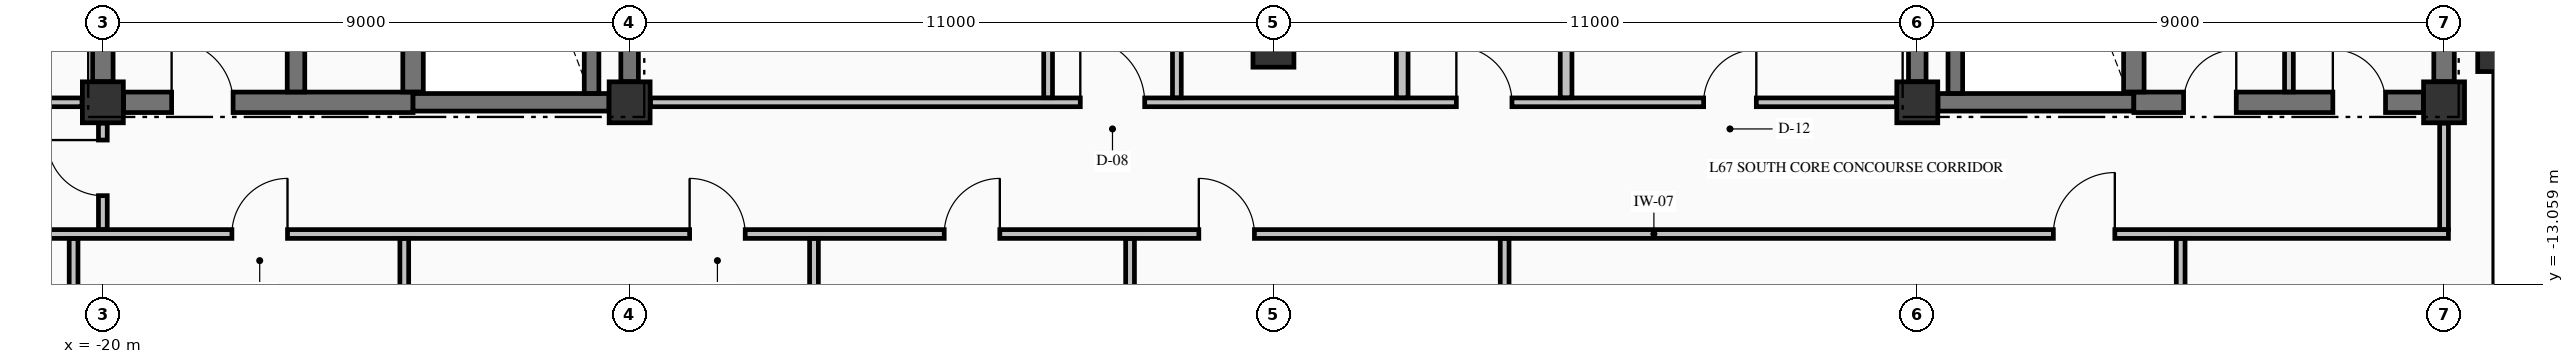
"""IFC4 building model, lengths in metres.
Left out: names, types, materials, properties, quantities, classifications, styles, units other than length and angle.
Written with IfcOpenShell. Run it as: python <this file> out.ifc"""

import sys

from ifc_helpers import new_model, si_unit, direction, frame, frame_2d, origin, origin_2d, place, context, subcontext, project, spatial, rectangle, extrude, element, fill, save


model = new_model("IFC4")
c1 = context("Model", 3, precision=1e-05, world=origin(), true_north=direction((0.0, 1.0)))
c2 = subcontext(c1, "Body", "Model", "MODEL_VIEW")
j1 = project(units=[si_unit("LENGTHUNIT", "METRE"), si_unit("PLANEANGLEUNIT", "RADIAN")], contexts=[c1])
p1 = place(None, origin())
s1 = spatial("IfcSite", under=j1, at=p1, CompositionType="ELEMENT")
p2 = place(p1, origin())
s2 = spatial("IfcBuilding", under=s1, at=p2, CompositionType="ELEMENT")
p3 = place(p2, frame((0.0, 0.0, 254.43)))
s3 = spatial("IfcBuildingStorey", under=s2, at=p3, CompositionType="ELEMENT", Elevation=254.43)
p4 = place(p3, frame((21.0, -9.0, -0.425), z_axis=(0.0, 0.0, 1.0), x_axis=(1.0, 0.0, 0.0)))
e1 = element("IfcColumn", 1, at=p4, inside=s3, PredefinedType="COLUMN", context=c2, shape_type="SweptSolid", body=[
    extrude(rectangle(XDim=0.85, YDim=0.85, at=origin_2d()), origin(), (0.0, 0.0, 1.0), 3.405),
])
for number, where, z_axis, x_axis in (
    (2, (-20.0, -9.95, -0.425), (0.0, 0.0, 1.0), (1.0, 0.0, 0.0)),
    (3, (-11.0, -9.95, -0.425), (0.0, 0.0, 1.0), (1.0, 0.0, 0.0)),
    (4, (11.0, -9.95, -0.425), (0.0, 0.0, 1.0), (1.0, 0.0, 0.0)),
    (5, (20.0, -9.95, -0.425), (0.0, 0.0, 1.0), (1.0, 0.0, 0.0)),
    (6, (0.0, -9.0, -0.425), (0.0, 0.0, 1.0), (1.0, 0.0, 0.0)),
):
    element("IfcColumn", number, at=place(p3, frame(where, z_axis=z_axis, x_axis=x_axis)), inside=s3, PredefinedType="COLUMN", context=c2, shape_type="SweptSolid", body=[
        extrude(rectangle(XDim=0.7, YDim=0.7, at=origin_2d()), origin(), (0.0, 0.0, 1.0), 3.405),
    ])
p5 = place(p3, frame((21.0, -17.545, 0.0), z_axis=(0.0, 0.0, 1.0), x_axis=(0.0, 1.0, 0.0)))
e7 = element("IfcWall", 7, at=p5, inside=s3, PredefinedType="STANDARD", context=c2, shape_type="SweptSolid", body=[
    extrude(rectangle(XDim=8.09, YDim=0.3, at=frame_2d((4.045, 0.0))), origin(), (0.0, 0.0, 1.0), 2.372),
])
p6 = place(p3, frame((-19.646, -9.95, 0.0), z_axis=(0.0, 0.0, 1.0), x_axis=(1.0, 0.0, 0.0)))
e8 = element("IfcWall", 8, at=p6, inside=s3, PredefinedType="SHEAR", context=c2, shape_type="SweptSolid", body=[
    extrude(rectangle(XDim=4.946, YDim=0.35, at=frame_2d((2.473, 0.0))), origin(), (0.0, 0.0, 1.0), 2.98),
])
p7 = place(p6, frame((0.821, 0.0, 0.0)))
e9 = element("IfcOpeningElement", 9, at=p7, cuts=e8, PredefinedType="OPENING", context=c2, shape_type="SweptSolid", body=[
    extrude(rectangle(XDim=1.05, YDim=2.15, at=frame_2d((0.525, 1.075))), frame((0.0, 0.185, 0.0), z_axis=(0.0, -1.0, 0.0), x_axis=(1.0, 0.0, 0.0)), (0.0, 0.0, 1.0), 0.37),
])
for number, where, z_axis, x_axis in (
    (10, (-14.7, -9.95, 0.0), (0.0, 0.0, 1.0), (1.0, 0.0, 0.0)),
    (11, (11.354, -9.95, 0.0), (0.0, 0.0, 1.0), (1.0, 0.0, 0.0)),
):
    element("IfcWall", number, at=place(p3, frame(where, z_axis=z_axis, x_axis=x_axis)), inside=s3, PredefinedType="SHEAR", context=c2, shape_type="SweptSolid", body=[
        extrude(rectangle(XDim=3.346, YDim=0.3, at=frame_2d((1.673, 0.0))), origin(), (0.0, 0.0, 1.0), 2.98),
    ])
p8 = place(p3, frame((14.7, -9.95, 0.0), z_axis=(0.0, 0.0, 1.0), x_axis=(1.0, 0.0, 0.0)))
e12 = element("IfcWall", 12, at=p8, inside=s3, PredefinedType="SHEAR", context=c2, shape_type="SweptSolid", body=[
    extrude(rectangle(XDim=4.946, YDim=0.35, at=frame_2d((2.473, 0.0))), origin(), (0.0, 0.0, 1.0), 2.98),
])
p9 = place(p8, frame((0.85, 0.0, 0.0)))
e13 = element("IfcOpeningElement", 13, at=p9, cuts=e12, PredefinedType="OPENING", context=c2, shape_type="SweptSolid", body=[
    extrude(rectangle(XDim=0.9, YDim=2.15, at=frame_2d((0.45, 1.075))), frame((0.0, 0.185, 0.0), z_axis=(0.0, -1.0, 0.0), x_axis=(1.0, 0.0, 0.0)), (0.0, 0.0, 1.0), 0.37),
])
p10 = place(p8, frame((3.4, 0.0, 0.0)))
e14 = element("IfcOpeningElement", 14, at=p10, cuts=e12, PredefinedType="OPENING", context=c2, shape_type="SweptSolid", body=[
    extrude(rectangle(XDim=0.9, YDim=2.15, at=frame_2d((0.45, 1.075))), frame((0.0, 0.185, 0.0), z_axis=(0.0, -1.0, 0.0), x_axis=(1.0, 0.0, 0.0)), (0.0, 0.0, 1.0), 0.37),
])
p11 = place(p3, frame((-25.835, -12.2, 0.0), z_axis=(0.0, 0.0, 1.0), x_axis=(1.0, 0.0, 0.0)))
e15 = element("IfcWall", 15, at=p11, inside=s3, PredefinedType="PARTITIONING", context=c2, shape_type="SweptSolid", body=[
    extrude(rectangle(XDim=45.91, YDim=0.15, at=frame_2d((22.955, 0.0))), origin(), (0.0, 0.0, 1.0), 2.98),
])
p12 = place(p11, frame((8.04, 0.0, 0.0)))
e16 = element("IfcOpeningElement", 16, at=p12, cuts=e15, PredefinedType="OPENING", context=c2, shape_type="SweptSolid", body=[
    extrude(rectangle(XDim=0.95, YDim=2.15, at=frame_2d((0.475, 1.075))), frame((0.0, 0.085, 0.0), z_axis=(0.0, -1.0, 0.0), x_axis=(1.0, 0.0, 0.0)), (0.0, 0.0, 1.0), 0.17),
])
p13 = place(p11, frame((15.86, 0.0, 0.0)))
e17 = element("IfcOpeningElement", 17, at=p13, cuts=e15, PredefinedType="OPENING", context=c2, shape_type="SweptSolid", body=[
    extrude(rectangle(XDim=0.95, YDim=2.15, at=frame_2d((0.475, 1.075))), frame((0.0, 0.085, 0.0), z_axis=(0.0, -1.0, 0.0), x_axis=(1.0, 0.0, 0.0)), (0.0, 0.0, 1.0), 0.17),
])
p14 = place(p11, frame((20.21, 0.0, 0.0)))
e18 = element("IfcOpeningElement", 18, at=p14, cuts=e15, PredefinedType="OPENING", context=c2, shape_type="SweptSolid", body=[
    extrude(rectangle(XDim=0.95, YDim=2.15, at=frame_2d((0.475, 1.075))), frame((0.0, 0.085, 0.0), z_axis=(0.0, -1.0, 0.0), x_axis=(1.0, 0.0, 0.0)), (0.0, 0.0, 1.0), 0.17),
])
p15 = place(p11, frame((24.56, 0.0, 0.0)))
e19 = element("IfcOpeningElement", 19, at=p15, cuts=e15, PredefinedType="OPENING", context=c2, shape_type="SweptSolid", body=[
    extrude(rectangle(XDim=0.95, YDim=2.15, at=frame_2d((0.475, 1.075))), frame((0.0, 0.085, 0.0), z_axis=(0.0, -1.0, 0.0), x_axis=(1.0, 0.0, 0.0)), (0.0, 0.0, 1.0), 0.17),
])
p16 = place(p11, frame((39.16, 0.0, 0.0)))
e20 = element("IfcOpeningElement", 20, at=p16, cuts=e15, PredefinedType="OPENING", context=c2, shape_type="SweptSolid", body=[
    extrude(rectangle(XDim=1.05, YDim=2.15, at=frame_2d((0.525, 1.075))), frame((0.0, 0.085, 0.0), z_axis=(0.0, -1.0, 0.0), x_axis=(1.0, 0.0, 0.0)), (0.0, 0.0, 1.0), 0.17),
])
p17 = place(p3, frame((-25.835, -9.95, 0.0), z_axis=(0.0, 0.0, 1.0), x_axis=(1.0, 0.0, 0.0)))
e21 = element("IfcWall", 21, at=p17, inside=s3, PredefinedType="PARTITIONING", context=c2, shape_type="SweptSolid", body=[
    extrude(rectangle(XDim=5.479, YDim=0.15, at=frame_2d((2.74, 0.0))), origin(), (0.0, 0.0, 1.0), 2.98),
])
p18 = place(p17, frame((2.335, 0.0, 0.0)))
e22 = element("IfcOpeningElement", 22, at=p18, cuts=e21, PredefinedType="OPENING", context=c2, shape_type="SweptSolid", body=[
    extrude(rectangle(XDim=1.0, YDim=2.15, at=frame_2d((0.5, 1.075))), frame((0.0, 0.085, 0.0), z_axis=(0.0, -1.0, 0.0), x_axis=(1.0, 0.0, 0.0)), (0.0, 0.0, 1.0), 0.17),
])
p19 = place(p3, frame((-10.644, -9.95, 0.0), z_axis=(0.0, 0.0, 1.0), x_axis=(1.0, 0.0, 0.0)))
e23 = element("IfcWall", 23, at=p19, inside=s3, PredefinedType="PARTITIONING", context=c2, shape_type="SweptSolid", body=[
    extrude(rectangle(XDim=21.288, YDim=0.15, at=frame_2d((10.644, 0.0))), origin(), (0.0, 0.0, 1.0), 2.98),
])
p20 = place(p19, frame((7.344, 0.0, 0.0)))
e24 = element("IfcOpeningElement", 24, at=p20, cuts=e23, PredefinedType="OPENING", context=c2, shape_type="SweptSolid", body=[
    extrude(rectangle(XDim=1.1, YDim=2.15, at=frame_2d((0.55, 1.075))), frame((0.0, 0.085, 0.0), z_axis=(0.0, -1.0, 0.0), x_axis=(1.0, 0.0, 0.0)), (0.0, 0.0, 1.0), 0.17),
])
p21 = place(p19, frame((13.769, 0.0, 0.0)))
e25 = element("IfcOpeningElement", 25, at=p21, cuts=e23, PredefinedType="OPENING", context=c2, shape_type="SweptSolid", body=[
    extrude(rectangle(XDim=0.95, YDim=2.15, at=frame_2d((0.475, 1.075))), frame((0.0, 0.085, 0.0), z_axis=(0.0, -1.0, 0.0), x_axis=(1.0, 0.0, 0.0)), (0.0, 0.0, 1.0), 0.17),
])
p22 = place(p19, frame((17.994, 0.0, 0.0)))
e26 = element("IfcOpeningElement", 26, at=p22, cuts=e23, PredefinedType="OPENING", context=c2, shape_type="SweptSolid", body=[
    extrude(rectangle(XDim=0.9, YDim=2.15, at=frame_2d((0.45, 1.075))), frame((0.0, 0.085, 0.0), z_axis=(0.0, -1.0, 0.0), x_axis=(1.0, 0.0, 0.0)), (0.0, 0.0, 1.0), 0.17),
])
p23 = place(p3, frame((-20.0, -9.596, 0.0), z_axis=(0.0, 0.0, 1.0), x_axis=(0.0, 1.0, 0.0)))
e27 = element("IfcWall", 27, at=p23, inside=s3, PredefinedType="SHEAR", context=c2, shape_type="SweptSolid", body=[
    extrude(rectangle(XDim=9.242, YDim=0.35, at=frame_2d((4.621, 0.0))), origin(), (0.0, 0.0, 1.0), 2.98),
])
p24 = place(p3, frame((-16.7, -9.773, 0.0), z_axis=(0.0, 0.0, 1.0), x_axis=(0.0, 1.0, 0.0)))
e28 = element("IfcWall", 28, at=p24, inside=s3, PredefinedType="SHEAR", context=c2, shape_type="SweptSolid", body=[
    extrude(rectangle(XDim=9.371, YDim=0.3, at=frame_2d((4.686, 0.0))), origin(), (0.0, 0.0, 1.0), 2.98),
])
p25 = place(p3, frame((-14.7, -9.773, 0.0), z_axis=(0.0, 0.0, 1.0), x_axis=(0.0, 1.0, 0.0)))
e29 = element("IfcWall", 29, at=p25, inside=s3, PredefinedType="SHEAR", context=c2, shape_type="SweptSolid", body=[
    extrude(rectangle(XDim=9.371, YDim=0.35, at=frame_2d((4.686, 0.0))), origin(), (0.0, 0.0, 1.0), 2.98),
])
p26 = place(p3, frame((-11.65, -9.798, 0.0), z_axis=(0.0, 0.0, 1.0), x_axis=(0.0, 1.0, 0.0)))
e30 = element("IfcWall", 30, at=p26, inside=s3, PredefinedType="SOLIDWALL", context=c2, shape_type="SweptSolid", body=[
    extrude(rectangle(XDim=9.396, YDim=0.25, at=frame_2d((4.698, 0.0))), origin(), (0.0, 0.0, 1.0), 2.98),
])
for number, where, z_axis, x_axis in (
    (31, (-11.0, -9.596, 0.0), (0.0, 0.0, 1.0), (0.0, 1.0, 0.0)),
    (32, (11.0, -9.596, 0.0), (0.0, 0.0, 1.0), (0.0, 1.0, 0.0)),
):
    element("IfcWall", number, at=place(p3, frame(where, z_axis=z_axis, x_axis=x_axis)), inside=s3, PredefinedType="SHEAR", context=c2, shape_type="SweptSolid", body=[
        extrude(rectangle(XDim=9.242, YDim=0.3, at=frame_2d((4.621, 0.0))), origin(), (0.0, 0.0, 1.0), 2.98),
    ])
p27 = place(p3, frame((11.65, -9.798, 0.0), z_axis=(0.0, 0.0, 1.0), x_axis=(0.0, 1.0, 0.0)))
e33 = element("IfcWall", 33, at=p27, inside=s3, PredefinedType="SOLIDWALL", context=c2, shape_type="SweptSolid", body=[
    extrude(rectangle(XDim=9.396, YDim=0.25, at=frame_2d((4.698, 0.0))), origin(), (0.0, 0.0, 1.0), 2.98),
])
p28 = place(p3, frame((14.7, -9.773, 0.0), z_axis=(0.0, 0.0, 1.0), x_axis=(0.0, 1.0, 0.0)))
e34 = element("IfcWall", 34, at=p28, inside=s3, PredefinedType="SHEAR", context=c2, shape_type="SweptSolid", body=[
    extrude(rectangle(XDim=9.371, YDim=0.35, at=frame_2d((4.686, 0.0))), origin(), (0.0, 0.0, 1.0), 2.98),
])
p29 = place(p3, frame((20.0, -9.596, 0.0), z_axis=(0.0, 0.0, 1.0), x_axis=(0.0, 1.0, 0.0)))
e35 = element("IfcWall", 35, at=p29, inside=s3, PredefinedType="SHEAR", context=c2, shape_type="SweptSolid", body=[
    extrude(rectangle(XDim=14.769, YDim=0.35, at=frame_2d((7.385, 0.0))), origin(), (0.0, 0.0, 1.0), 2.98),
])
p30 = place(p3, frame((-20.5, -17.569, 0.0), z_axis=(0.0, 0.0, 1.0), x_axis=(0.0, 1.0, 0.0)))
e36 = element("IfcWall", 36, at=p30, inside=s3, PredefinedType="PARTITIONING", context=c2, shape_type="SweptSolid", body=[
    extrude(rectangle(XDim=5.291, YDim=0.15, at=frame_2d((2.646, 0.0))), origin(), (0.0, 0.0, 1.0), 2.98),
])
p31 = place(p3, frame((-20.0, -12.122, 0.0), z_axis=(0.0, 0.0, 1.0), x_axis=(0.0, 1.0, 0.0)))
e37 = element("IfcWall", 37, at=p31, inside=s3, PredefinedType="PARTITIONING", context=c2, shape_type="SweptSolid", body=[
    extrude(rectangle(XDim=1.816, YDim=0.15, at=frame_2d((0.908, 0.0))), origin(), (0.0, 0.0, 1.0), 2.98),
])
p32 = place(p31, frame((0.577, 0.0, 0.0)))
e38 = element("IfcOpeningElement", 38, at=p32, cuts=e37, PredefinedType="OPENING", context=c2, shape_type="SweptSolid", body=[
    extrude(rectangle(XDim=0.95, YDim=2.15, at=frame_2d((0.475, 1.075))), frame((0.0, 0.085, 0.0), z_axis=(0.0, -1.0, 0.0), x_axis=(1.0, 0.0, 0.0)), (0.0, 0.0, 1.0), 0.17),
])
for number, where, z_axis, x_axis in (
    (39, (-14.85, -23.335, 0.0), (0.0, 0.0, 1.0), (0.0, 1.0, 0.0)),
    (40, (-7.85, -23.335, 0.0), (0.0, 0.0, 1.0), (0.0, 1.0, 0.0)),
):
    element("IfcWall", number, at=place(p3, frame(where, z_axis=z_axis, x_axis=x_axis)), inside=s3, PredefinedType="PARTITIONING", context=c2, shape_type="SweptSolid", body=[
        extrude(rectangle(XDim=11.057, YDim=0.15, at=frame_2d((5.528, 0.0))), origin(), (0.0, 0.0, 1.0), 2.98),
    ])
p33 = place(p3, frame((-3.85, -9.872, 0.0), z_axis=(0.0, 0.0, 1.0), x_axis=(0.0, 1.0, 0.0)))
e41 = element("IfcWall", 41, at=p33, inside=s3, PredefinedType="PARTITIONING", context=c2, shape_type="SweptSolid", body=[
    extrude(rectangle(XDim=9.544, YDim=0.15, at=frame_2d((4.772, 0.0))), origin(), (0.0, 0.0, 1.0), 2.98),
])
p34 = place(p3, frame((-2.45, -23.335, 0.0), z_axis=(0.0, 0.0, 1.0), x_axis=(0.0, 1.0, 0.0)))
e42 = element("IfcWall", 42, at=p34, inside=s3, PredefinedType="PARTITIONING", context=c2, shape_type="SweptSolid", body=[
    extrude(rectangle(XDim=11.057, YDim=0.15, at=frame_2d((5.528, 0.0))), origin(), (0.0, 0.0, 1.0), 2.98),
])
p35 = place(p3, frame((-1.65, -9.872, 0.0), z_axis=(0.0, 0.0, 1.0), x_axis=(0.0, 1.0, 0.0)))
e43 = element("IfcWall", 43, at=p35, inside=s3, PredefinedType="PARTITIONING", context=c2, shape_type="SweptSolid", body=[
    extrude(rectangle(XDim=4.419, YDim=0.15, at=frame_2d((2.209, 0.0))), origin(), (0.0, 0.0, 1.0), 2.98),
])
p36 = place(p35, frame((2.597, 0.0, 0.0)))
e44 = element("IfcOpeningElement", 44, at=p36, cuts=e43, PredefinedType="OPENING", context=c2, shape_type="SweptSolid", body=[
    extrude(rectangle(XDim=0.95, YDim=2.15, at=frame_2d((0.475, 1.075))), frame((0.0, 0.085, 0.0), z_axis=(0.0, -1.0, 0.0), x_axis=(1.0, 0.0, 0.0)), (0.0, 0.0, 1.0), 0.17),
])
p37 = place(p3, frame((2.2, -9.872, 0.0), z_axis=(0.0, 0.0, 1.0), x_axis=(0.0, 1.0, 0.0)))
e45 = element("IfcWall", 45, at=p37, inside=s3, PredefinedType="PARTITIONING", context=c2, shape_type="SweptSolid", body=[
    extrude(rectangle(XDim=4.419, YDim=0.2, at=frame_2d((2.209, 0.0))), origin(), (0.0, 0.0, 1.0), 2.98),
])
p38 = place(p3, frame((3.95, -23.335, 0.0), z_axis=(0.0, 0.0, 1.0), x_axis=(0.0, 1.0, 0.0)))
e46 = element("IfcWall", 46, at=p38, inside=s3, PredefinedType="PARTITIONING", context=c2, shape_type="SweptSolid", body=[
    extrude(rectangle(XDim=11.057, YDim=0.15, at=frame_2d((5.528, 0.0))), origin(), (0.0, 0.0, 1.0), 2.98),
])
p39 = place(p3, frame((5.0, -9.872, 0.0), z_axis=(0.0, 0.0, 1.0), x_axis=(0.0, 1.0, 0.0)))
e47 = element("IfcWall", 47, at=p39, inside=s3, PredefinedType="PARTITIONING", context=c2, shape_type="SweptSolid", body=[
    extrude(rectangle(XDim=4.419, YDim=0.2, at=frame_2d((2.209, 0.0))), origin(), (0.0, 0.0, 1.0), 2.98),
])
p40 = place(p3, frame((15.5, -17.569, 0.0), z_axis=(0.0, 0.0, 1.0), x_axis=(0.0, 1.0, 0.0)))
e48 = element("IfcWall", 48, at=p40, inside=s3, PredefinedType="PARTITIONING", context=c2, shape_type="SweptSolid", body=[
    extrude(rectangle(XDim=5.291, YDim=0.15, at=frame_2d((2.646, 0.0))), origin(), (0.0, 0.0, 1.0), 2.98),
])
p41 = place(p3, frame((17.35, -9.772, 0.0), z_axis=(0.0, 0.0, 1.0), x_axis=(0.0, 1.0, 0.0)))
e49 = element("IfcWall", 49, at=p41, inside=s3, PredefinedType="PARTITIONING", context=c2, shape_type="SweptSolid", body=[
    extrude(rectangle(XDim=14.494, YDim=0.15, at=frame_2d((7.247, 0.0))), origin(), (0.0, 0.0, 1.0), 2.98),
])
p42 = place(p3, frame((20.0, -12.122, 0.0), z_axis=(0.0, 0.0, 1.0), x_axis=(0.0, 1.0, 0.0)))
e50 = element("IfcWall", 50, at=p42, inside=s3, PredefinedType="PARTITIONING", context=c2, shape_type="SweptSolid", body=[
    extrude(rectangle(XDim=1.816, YDim=0.15, at=frame_2d((0.908, 0.0))), origin(), (0.0, 0.0, 1.0), 2.57),
])
p43 = place(p7, origin())
e51 = element("IfcDoor", 51, at=p43, inside=s3, OperationType="SINGLE_SWING_LEFT", PredefinedType="DOOR", context=c2, shape_type="SweptSolid", body=[
    extrude(rectangle(XDim=1.05, YDim=2.15, at=frame_2d((0.525, 1.075))), frame((0.0, 0.025, 0.0), z_axis=(0.0, -1.0, 0.0), x_axis=(1.0, 0.0, 0.0)), (0.0, 0.0, 1.0), 0.05),
])
fill(e9, e51)
p44 = place(p9, origin())
e52 = element("IfcDoor", 52, at=p44, inside=s3, OperationType="SINGLE_SWING_RIGHT", PredefinedType="DOOR", context=c2, shape_type="SweptSolid", body=[
    extrude(rectangle(XDim=0.9, YDim=2.15, at=frame_2d((0.45, 1.075))), frame((0.0, 0.025, 0.0), z_axis=(0.0, -1.0, 0.0), x_axis=(1.0, 0.0, 0.0)), (0.0, 0.0, 1.0), 0.05),
])
fill(e13, e52)
p45 = place(p10, origin())
e53 = element("IfcDoor", 53, at=p45, inside=s3, OperationType="SINGLE_SWING_LEFT", PredefinedType="DOOR", context=c2, shape_type="SweptSolid", body=[
    extrude(rectangle(XDim=0.9, YDim=2.15, at=frame_2d((0.45, 1.075))), frame((0.0, 0.025, 0.0), z_axis=(0.0, -1.0, 0.0), x_axis=(1.0, 0.0, 0.0)), (0.0, 0.0, 1.0), 0.05),
])
fill(e14, e53)
p46 = place(p20, origin())
e54 = element("IfcDoor", 54, at=p46, inside=s3, OperationType="SINGLE_SWING_LEFT", PredefinedType="DOOR", context=c2, shape_type="SweptSolid", body=[
    extrude(rectangle(XDim=1.1, YDim=2.15, at=frame_2d((0.55, 1.075))), frame((0.0, 0.025, 0.0), z_axis=(0.0, -1.0, 0.0), x_axis=(1.0, 0.0, 0.0)), (0.0, 0.0, 1.0), 0.05),
])
fill(e24, e54)
p47 = place(p12, origin())
e55 = element("IfcDoor", 55, at=p47, inside=s3, OperationType="SINGLE_SWING_RIGHT", PredefinedType="DOOR", context=c2, shape_type="SweptSolid", body=[
    extrude(rectangle(XDim=0.95, YDim=2.15, at=frame_2d((0.475, 1.075))), frame((0.0, 0.025, 0.0), z_axis=(0.0, -1.0, 0.0), x_axis=(1.0, 0.0, 0.0)), (0.0, 0.0, 1.0), 0.05),
])
fill(e16, e55)
p48 = place(p13, origin())
e56 = element("IfcDoor", 56, at=p48, inside=s3, OperationType="SINGLE_SWING_LEFT", PredefinedType="DOOR", context=c2, shape_type="SweptSolid", body=[
    extrude(rectangle(XDim=0.95, YDim=2.15, at=frame_2d((0.475, 1.075))), frame((0.0, 0.025, 0.0), z_axis=(0.0, -1.0, 0.0), x_axis=(1.0, 0.0, 0.0)), (0.0, 0.0, 1.0), 0.05),
])
fill(e17, e56)
p49 = place(p14, origin())
e57 = element("IfcDoor", 57, at=p49, inside=s3, OperationType="SINGLE_SWING_RIGHT", PredefinedType="DOOR", context=c2, shape_type="SweptSolid", body=[
    extrude(rectangle(XDim=0.95, YDim=2.15, at=frame_2d((0.475, 1.075))), frame((0.0, 0.025, 0.0), z_axis=(0.0, -1.0, 0.0), x_axis=(1.0, 0.0, 0.0)), (0.0, 0.0, 1.0), 0.05),
])
fill(e18, e57)
p50 = place(p15, origin())
e58 = element("IfcDoor", 58, at=p50, inside=s3, OperationType="SINGLE_SWING_LEFT", PredefinedType="DOOR", context=c2, shape_type="SweptSolid", body=[
    extrude(rectangle(XDim=0.95, YDim=2.15, at=frame_2d((0.475, 1.075))), frame((0.0, 0.025, 0.0), z_axis=(0.0, -1.0, 0.0), x_axis=(1.0, 0.0, 0.0)), (0.0, 0.0, 1.0), 0.05),
])
fill(e19, e58)
p51 = place(p16, origin())
e59 = element("IfcDoor", 59, at=p51, inside=s3, OperationType="SINGLE_SWING_RIGHT", PredefinedType="DOOR", context=c2, shape_type="SweptSolid", body=[
    extrude(rectangle(XDim=1.05, YDim=2.15, at=frame_2d((0.525, 1.075))), frame((0.0, 0.025, 0.0), z_axis=(0.0, -1.0, 0.0), x_axis=(1.0, 0.0, 0.0)), (0.0, 0.0, 1.0), 0.05),
])
fill(e20, e59)
p52 = place(p21, origin())
e60 = element("IfcDoor", 60, at=p52, inside=s3, OperationType="SINGLE_SWING_LEFT", PredefinedType="DOOR", context=c2, shape_type="SweptSolid", body=[
    extrude(rectangle(XDim=0.95, YDim=2.15, at=frame_2d((0.475, 1.075))), frame((0.0, 0.025, 0.0), z_axis=(0.0, -1.0, 0.0), x_axis=(1.0, 0.0, 0.0)), (0.0, 0.0, 1.0), 0.05),
])
fill(e25, e60)
p53 = place(p22, origin())
e61 = element("IfcDoor", 61, at=p53, inside=s3, OperationType="SINGLE_SWING_RIGHT", PredefinedType="DOOR", context=c2, shape_type="SweptSolid", body=[
    extrude(rectangle(XDim=0.9, YDim=2.15, at=frame_2d((0.45, 1.075))), frame((0.0, 0.025, 0.0), z_axis=(0.0, -1.0, 0.0), x_axis=(1.0, 0.0, 0.0)), (0.0, 0.0, 1.0), 0.05),
])
fill(e26, e61)
p54 = place(p32, origin())
e62 = element("IfcDoor", 62, at=p54, inside=s3, OperationType="SINGLE_SWING_RIGHT", PredefinedType="DOOR", context=c2, shape_type="SweptSolid", body=[
    extrude(rectangle(XDim=0.95, YDim=2.15, at=frame_2d((0.475, 1.075))), frame((0.0, 0.025, 0.0), z_axis=(0.0, -1.0, 0.0), x_axis=(1.0, 0.0, 0.0)), (0.0, 0.0, 1.0), 0.05),
])
fill(e38, e62)
save(model, sys.argv[1])
